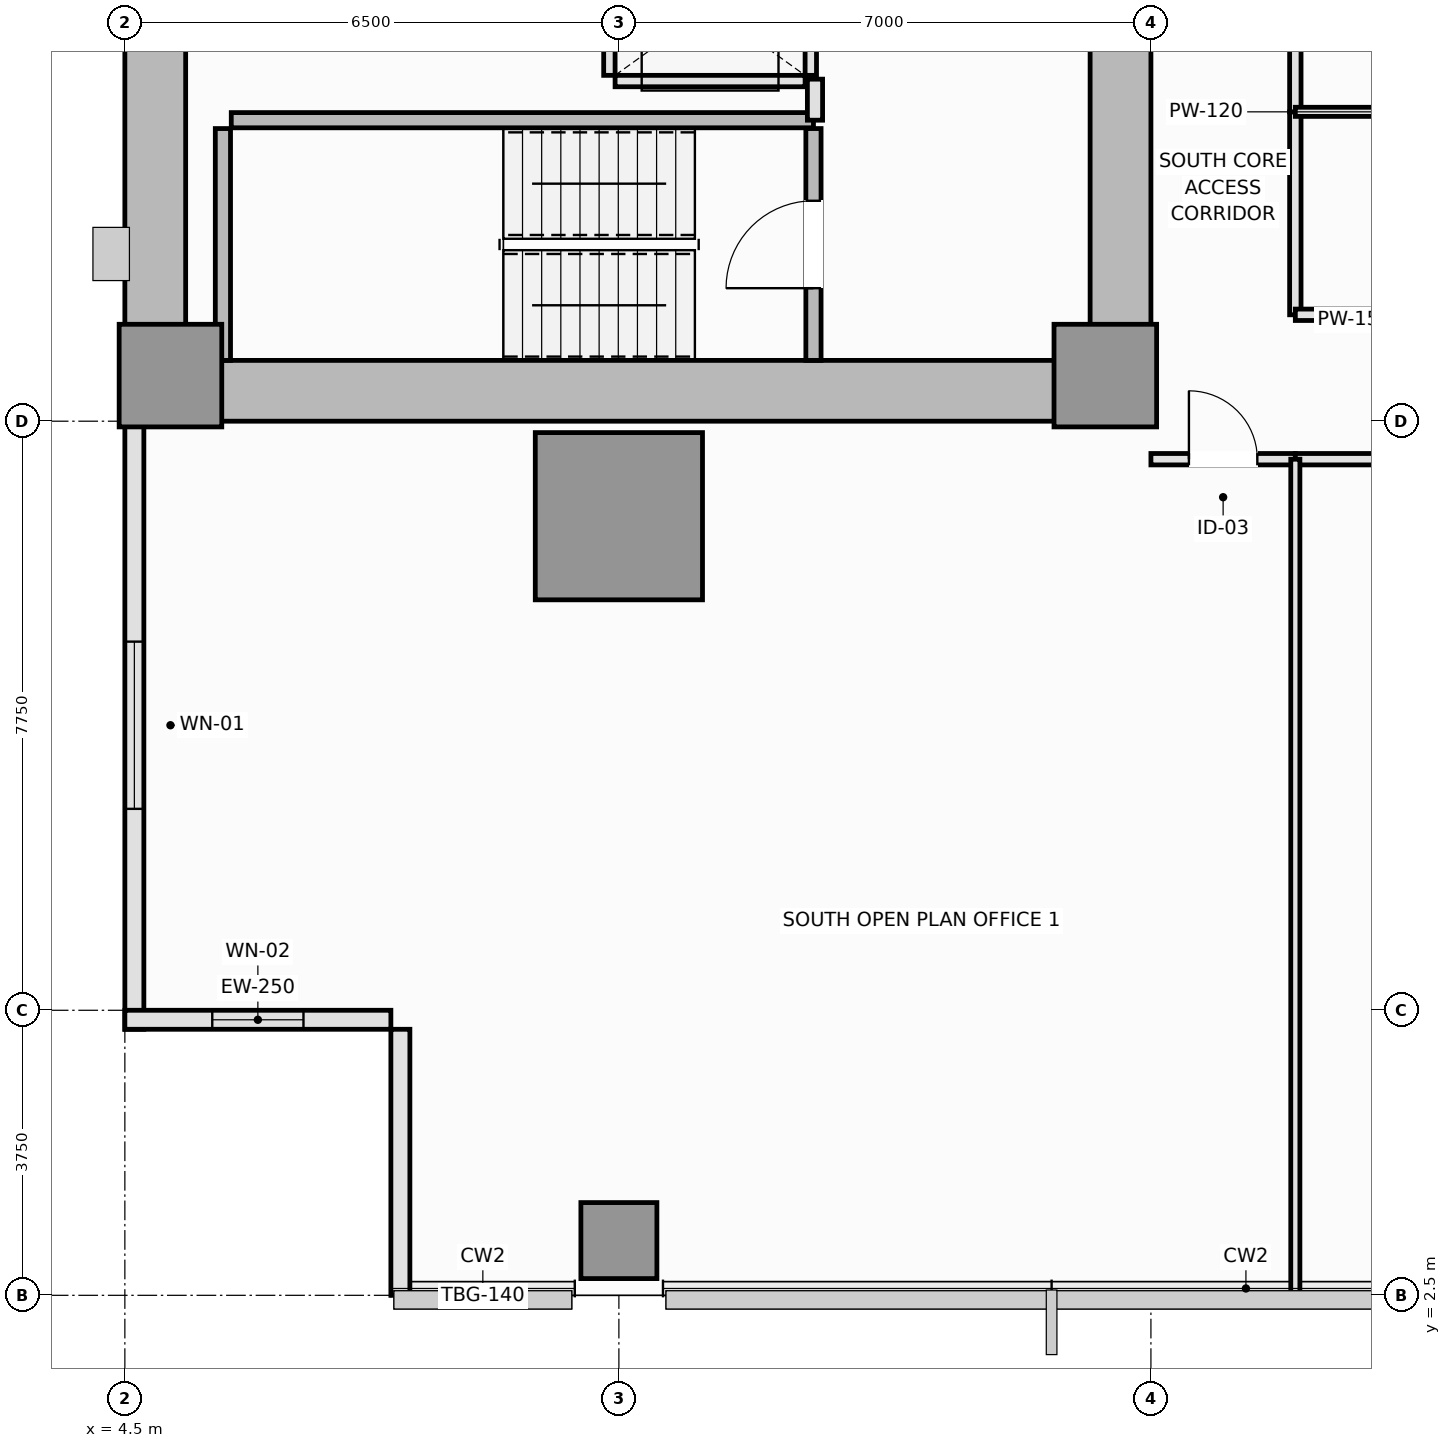
"""IFC4 building model, lengths in metres.
Left out: names, types, materials, properties, quantities, classifications, styles, units other than length and angle.
Written with IfcOpenShell. Run it as: python <this file> out.ifc"""

import sys

from ifc_helpers import new_model, si_unit, direction, frame, frame_2d, origin, origin_2d, place, context, subcontext, project, spatial, rectangle, extrude, element, fill, save


model = new_model("IFC4")
c1 = context("Model", 3, precision=1e-05, world=origin(), true_north=direction((0.0, 1.0)))
c2 = subcontext(c1, "Body", "Model", "MODEL_VIEW")
j1 = project(units=[si_unit("LENGTHUNIT", "METRE"), si_unit("PLANEANGLEUNIT", "RADIAN")], contexts=[c1])
p1 = place(None, origin())
s1 = spatial("IfcSite", under=j1, at=p1, CompositionType="ELEMENT")
p2 = place(p1, origin())
s2 = spatial("IfcBuilding", under=s1, at=p2, CompositionType="ELEMENT")
p3 = place(p2, frame((0.0, 0.0, 89.5)))
s3 = spatial("IfcBuildingStorey", under=s2, at=p3, CompositionType="ELEMENT", Elevation=89.5)
p4 = place(p3, frame((4.5, 14.4, 0.0), z_axis=(0.0, 0.0, 1.0), x_axis=(1.0, 0.0, 0.0)))
e1 = element("IfcWall", 1, at=p4, inside=s3, PredefinedType="SHEAR", context=c2, shape_type="SweptSolid", body=[
    extrude(rectangle(XDim=13.5, YDim=0.8, at=frame_2d((6.75, 0.0))), origin(), (0.0, 0.0, 1.0), 3.55),
])
p5 = place(p3, frame((4.9, 14.8, 0.0), z_axis=(0.0, 0.0, 1.0), x_axis=(0.0, 1.0, 0.0)))
e2 = element("IfcWall", 2, at=p5, inside=s3, PredefinedType="SHEAR", context=c2, shape_type="SweptSolid", body=[
    extrude(rectangle(XDim=20.9, YDim=0.8, at=frame_2d((10.45, 0.0))), origin(), (0.0, 0.0, 1.0), 3.55),
])
p6 = place(p3, frame((17.6, 14.8, 0.0), z_axis=(0.0, 0.0, 1.0), x_axis=(0.0, 1.0, 0.0)))
e3 = element("IfcWall", 3, at=p6, inside=s3, PredefinedType="SHEAR", context=c2, shape_type="SweptSolid", body=[
    extrude(rectangle(XDim=8.65, YDim=0.8, at=frame_2d((4.325, 0.0))), origin(), (0.0, 0.0, 1.0), 3.55),
])
p7 = place(p6, frame((4.1, 0.0, 0.0)))
e4 = element("IfcOpeningElement", 4, at=p7, cuts=e3, PredefinedType="OPENING", context=c2, shape_type="SweptSolid", body=[
    extrude(rectangle(XDim=1.1, YDim=2.15, at=frame_2d((0.55, 1.075))), frame((0.0, 0.41, 0.0), z_axis=(0.0, -1.0, 0.0), x_axis=(1.0, 0.0, 0.0)), (0.0, 0.0, 1.0), 0.82),
])
for number, where, z_axis, x_axis in (
    (5, (5.1, 14.6, 0.0), (0.0, 0.0, 1.0), (1.0, 0.0, 0.0)),
    (6, (17.4, 14.6, 0.0), (0.0, 0.0, 1.0), (1.0, 0.0, 0.0)),
):
    element("IfcColumn", number, at=place(p3, frame(where, z_axis=z_axis, x_axis=x_axis)), inside=s3, PredefinedType="PILASTER", context=c2, shape_type="SweptSolid", body=[
        extrude(rectangle(XDim=1.35, YDim=1.35, at=origin_2d()), origin(), (0.0, 0.0, 1.0), 3.55),
    ])
p8 = place(p3, frame((11.0, 12.75, 0.0), z_axis=(0.0, 0.0, 1.0), x_axis=(1.0, 0.0, 0.0)))
e7 = element("IfcColumn", 7, at=p8, inside=s3, PredefinedType="COLUMN", context=c2, shape_type="SweptSolid", body=[
    extrude(rectangle(XDim=2.2, YDim=2.2, at=origin_2d()), origin(), (0.0, 0.0, 1.0), 3.55),
])
p9 = place(p3, frame((11.0, 3.22, 0.0), z_axis=(0.0, 0.0, 1.0), x_axis=(1.0, 0.0, 0.0)))
e8 = element("IfcColumn", 8, at=p9, inside=s3, PredefinedType="COLUMN", context=c2, shape_type="SweptSolid", body=[
    extrude(rectangle(XDim=1.0, YDim=1.0, at=origin_2d()), origin(), (0.0, 0.0, 1.0), 3.55),
])
p10 = place(p3, frame((4.625, 14.0, 0.0), z_axis=(0.0, 0.0, 1.0), x_axis=(0.0, -1.0, 0.0)))
e9 = element("IfcWall", 9, at=p10, inside=s3, PredefinedType="SOLIDWALL", context=c2, shape_type="SweptSolid", body=[
    extrude(rectangle(XDim=8.0, YDim=0.25, at=frame_2d((4.0, 0.0))), origin(), (0.0, 0.0, 1.0), 3.35),
])
p11 = place(p10, frame((2.9, 0.0, 0.9)))
e10 = element("IfcOpeningElement", 10, at=p11, cuts=e9, PredefinedType="OPENING", context=c2, shape_type="SweptSolid", body=[
    extrude(rectangle(XDim=2.2, YDim=1.8, at=frame_2d((1.1, 0.9))), frame((0.0, 0.135, 0.0), z_axis=(0.0, -1.0, 0.0), x_axis=(1.0, 0.0, 0.0)), (0.0, 0.0, 1.0), 0.27),
])
p12 = place(p3, frame((4.5, 6.125, 0.0), z_axis=(0.0, 0.0, 1.0), x_axis=(1.0, 0.0, 0.0)))
e11 = element("IfcWall", 11, at=p12, inside=s3, PredefinedType="SOLIDWALL", context=c2, shape_type="SweptSolid", body=[
    extrude(rectangle(XDim=3.5, YDim=0.25, at=frame_2d((1.75, 0.0))), origin(), (0.0, 0.0, 1.0), 3.35),
])
p13 = place(p12, frame((1.15, 0.0, 0.9)))
e12 = element("IfcOpeningElement", 12, at=p13, cuts=e11, PredefinedType="OPENING", context=c2, shape_type="SweptSolid", body=[
    extrude(rectangle(XDim=1.2, YDim=1.8, at=frame_2d((0.6, 0.9))), frame((0.0, 0.135, 0.0), z_axis=(0.0, -1.0, 0.0), x_axis=(1.0, 0.0, 0.0)), (0.0, 0.0, 1.0), 0.27),
])
p14 = place(p3, frame((8.125, 6.0, 0.0), z_axis=(0.0, 0.0, 1.0), x_axis=(0.0, -1.0, 0.0)))
e13 = element("IfcWall", 13, at=p14, inside=s3, PredefinedType="SOLIDWALL", context=c2, shape_type="SweptSolid", body=[
    extrude(rectangle(XDim=3.5, YDim=0.25, at=frame_2d((1.75, 0.0))), origin(), (0.0, 0.0, 1.0), 3.35),
])
p15 = place(p3, frame((5.79, 14.8, 0.0), z_axis=(0.0, 0.0, 1.0), x_axis=(0.0, 1.0, 0.0)))
e14 = element("IfcWall", 14, at=p15, inside=s3, PredefinedType="SOLIDWALL", context=c2, shape_type="SweptSolid", body=[
    extrude(rectangle(XDim=3.05, YDim=0.2, at=frame_2d((1.525, 0.0))), origin(), (0.0, 0.0, 1.0), 3.55),
])
p16 = place(p3, frame((5.9, 17.96, 0.0), z_axis=(0.0, 0.0, 1.0), x_axis=(1.0, 0.0, 0.0)))
e15 = element("IfcWall", 15, at=p16, inside=s3, PredefinedType="SOLIDWALL", context=c2, shape_type="SweptSolid", body=[
    extrude(rectangle(XDim=7.66, YDim=0.2, at=frame_2d((3.83, 0.0))), origin(), (0.0, 0.0, 1.0), 3.55),
])
p17 = place(p3, frame((13.56, 14.8, 0.0), z_axis=(0.0, 0.0, 1.0), x_axis=(0.0, 1.0, 0.0)))
e16 = element("IfcWall", 16, at=p17, inside=s3, PredefinedType="SOLIDWALL", context=c2, shape_type="SweptSolid", body=[
    extrude(rectangle(XDim=3.05, YDim=0.2, at=frame_2d((1.525, 0.0))), origin(), (0.0, 0.0, 1.0), 3.55),
])
p18 = place(p17, frame((0.95, 0.0, 0.0)))
e17 = element("IfcOpeningElement", 17, at=p18, cuts=e16, PredefinedType="OPENING", context=c2, shape_type="SweptSolid", body=[
    extrude(rectangle(XDim=1.15, YDim=2.15, at=frame_2d((0.575, 1.075))), frame((0.0, 0.11, 0.0), z_axis=(0.0, -1.0, 0.0), x_axis=(1.0, 0.0, 0.0)), (0.0, 0.0, 1.0), 0.22),
])
p19 = place(p3, frame((10.95, 18.475, 0.0), z_axis=(0.0, 0.0, 1.0), x_axis=(1.0, 0.0, 0.0)))
e18 = element("IfcWall", 18, at=p19, inside=s3, PredefinedType="PARTITIONING", context=c2, shape_type="SweptSolid", body=[
    extrude(rectangle(XDim=2.5, YDim=0.15, at=frame_2d((1.25, 0.0))), origin(), (0.0, 0.0, 1.0), 3.35),
])
p20 = place(p3, frame((10.875, 18.55, 0.0), z_axis=(0.0, 0.0, 1.0), x_axis=(0.0, 1.0, 0.0)))
e19 = element("IfcWall", 19, at=p20, inside=s3, PredefinedType="PARTITIONING", context=c2, shape_type="SweptSolid", body=[
    extrude(rectangle(XDim=1.8, YDim=0.15, at=frame_2d((0.9, 0.0))), origin(), (0.0, 0.0, 1.0), 3.35),
])
p21 = place(p3, frame((13.525, 18.55, 0.0), z_axis=(0.0, 0.0, 1.0), x_axis=(0.0, 1.0, 0.0)))
e20 = element("IfcWall", 20, at=p21, inside=s3, PredefinedType="PARTITIONING", context=c2, shape_type="SweptSolid", body=[
    extrude(rectangle(XDim=1.8, YDim=0.15, at=frame_2d((0.9, 0.0))), origin(), (0.0, 0.0, 1.0), 3.35),
])
p22 = place(p21, frame((0.35, 0.0, 0.0)))
e21 = element("IfcOpeningElement", 21, at=p22, cuts=e20, PredefinedType="OPENING", context=c2, shape_type="SweptSolid", body=[
    extrude(rectangle(XDim=1.1, YDim=2.2, at=frame_2d((0.55, 1.1))), frame((0.0, 0.085, 0.0), z_axis=(0.0, -1.0, 0.0), x_axis=(1.0, 0.0, 0.0)), (0.0, 0.0, 1.0), 0.17),
])
p23 = place(p3, frame((13.58, 17.96, 0.0), z_axis=(0.0, 0.0, 1.0), x_axis=(0.0, 1.0, 0.0)))
e22 = element("IfcWall", 22, at=p23, inside=s3, PredefinedType="PARTITIONING", context=c2, shape_type="SweptSolid", body=[
    extrude(rectangle(XDim=0.54, YDim=0.2, at=frame_2d((0.27, 0.0))), origin(), (0.0, 0.0, 1.0), 3.35),
])
p24 = place(p3, frame((19.9, 15.4, 0.0), z_axis=(0.0, 0.0, 1.0), x_axis=(0.0, 1.0, 0.0)))
e23 = element("IfcWall", 23, at=p24, inside=s3, PredefinedType="PARTITIONING", context=c2, shape_type="SweptSolid", body=[
    extrude(rectangle(XDim=2.67, YDim=0.15, at=frame_2d((1.335, 0.0))), origin(), (0.0, 0.0, 1.0), 3.35),
])
p25 = place(p3, frame((19.9, 18.07, 0.0), z_axis=(0.0, 0.0, 1.0), x_axis=(0.0, 1.0, 0.0)))
e24 = element("IfcWall", 24, at=p25, inside=s3, PredefinedType="PARTITIONING", context=c2, shape_type="SweptSolid", body=[
    extrude(rectangle(XDim=2.68, YDim=0.15, at=frame_2d((1.34, 0.0))), origin(), (0.0, 0.0, 1.0), 3.35),
])
p26 = place(p3, frame((19.9, 15.4, 0.0), z_axis=(0.0, 0.0, 1.0), x_axis=(1.0, 0.0, 0.0)))
e25 = element("IfcWall", 25, at=p26, inside=s3, PredefinedType="PARTITIONING", context=c2, shape_type="SweptSolid", body=[
    extrude(rectangle(XDim=2.65, YDim=0.15, at=frame_2d((1.325, 0.0))), origin(), (0.0, 0.0, 1.0), 3.35),
])
p27 = place(p3, frame((18.0, 13.5, 0.0), z_axis=(0.0, 0.0, 1.0), x_axis=(1.0, 0.0, 0.0)))
e26 = element("IfcWall", 26, at=p27, inside=s3, PredefinedType="PARTITIONING", context=c2, shape_type="SweptSolid", body=[
    extrude(rectangle(XDim=1.9, YDim=0.15, at=frame_2d((0.95, 0.0))), origin(), (0.0, 0.0, 1.0), 3.35),
])
p28 = place(p27, frame((0.5, 0.0, 0.0)))
e27 = element("IfcOpeningElement", 27, at=p28, cuts=e26, PredefinedType="OPENING", context=c2, shape_type="SweptSolid", body=[
    extrude(rectangle(XDim=0.9, YDim=2.1, at=frame_2d((0.45, 1.05))), frame((0.0, 0.085, 0.0), z_axis=(0.0, -1.0, 0.0), x_axis=(1.0, 0.0, 0.0)), (0.0, 0.0, 1.0), 0.17),
])
p29 = place(p3, frame((19.9, 13.5, 0.0), z_axis=(0.0, 0.0, 1.0), x_axis=(1.0, 0.0, 0.0)))
e28 = element("IfcWall", 28, at=p29, inside=s3, PredefinedType="PARTITIONING", context=c2, shape_type="SweptSolid", body=[
    extrude(rectangle(XDim=3.7, YDim=0.15, at=frame_2d((1.85, 0.0))), origin(), (0.0, 0.0, 1.0), 3.35),
])
p30 = place(p29, frame((1.35, 0.0, 0.0)))
e29 = element("IfcOpeningElement", 29, at=p30, cuts=e28, PredefinedType="OPENING", context=c2, shape_type="SweptSolid", body=[
    extrude(rectangle(XDim=1.0, YDim=2.15, at=frame_2d((0.5, 1.075))), frame((0.0, 0.085, 0.0), z_axis=(0.0, -1.0, 0.0), x_axis=(1.0, 0.0, 0.0)), (0.0, 0.0, 1.0), 0.17),
])
p31 = place(p3, frame((19.9, 18.07, 0.0), z_axis=(0.0, 0.0, 1.0), x_axis=(1.0, 0.0, 0.0)))
e30 = element("IfcWall", 30, at=p31, inside=s3, PredefinedType="PARTITIONING", context=c2, shape_type="SweptSolid", body=[
    extrude(rectangle(XDim=2.65, YDim=0.12, at=frame_2d((1.325, 0.0))), origin(), (0.0, 0.0, 1.0), 3.35),
])
p32 = place(p3, frame((19.9, 2.51, 0.0), z_axis=(0.0, 0.0, 1.0), x_axis=(0.0, 1.0, 0.0)))
e31 = element("IfcWall", 31, at=p32, inside=s3, PredefinedType="PARTITIONING", context=c2, shape_type="SweptSolid", body=[
    extrude(rectangle(XDim=10.99, YDim=0.12, at=frame_2d((5.495, 0.0))), origin(), (0.0, 0.0, 1.0), 3.35),
])
p33 = place(p11, origin())
e32 = element("IfcWindow", 32, at=p33, inside=s3, PartitioningType="SINGLE_PANEL", PredefinedType="WINDOW", context=c2, shape_type="SweptSolid", body=[
    extrude(rectangle(XDim=2.2, YDim=1.8, at=frame_2d((1.1, 0.9))), frame((0.0, 0.03, 0.0), z_axis=(0.0, -1.0, 0.0), x_axis=(1.0, 0.0, 0.0)), (0.0, 0.0, 1.0), 0.06),
])
fill(e10, e32)
p34 = place(p13, origin())
e33 = element("IfcWindow", 33, at=p34, inside=s3, PartitioningType="SINGLE_PANEL", PredefinedType="WINDOW", context=c2, shape_type="SweptSolid", body=[
    extrude(rectangle(XDim=1.2, YDim=1.8, at=frame_2d((0.6, 0.9))), frame((0.0, 0.03, 0.0), z_axis=(0.0, -1.0, 0.0), x_axis=(1.0, 0.0, 0.0)), (0.0, 0.0, 1.0), 0.06),
])
fill(e12, e33)
p35 = place(p18, origin())
e34 = element("IfcDoor", 34, at=p35, inside=s3, OperationType="SINGLE_SWING_LEFT", PredefinedType="DOOR", context=c2, shape_type="SweptSolid", body=[
    extrude(rectangle(XDim=1.15, YDim=2.15, at=frame_2d((0.575, 1.075))), frame((0.0, 0.025, 0.0), z_axis=(0.0, -1.0, 0.0), x_axis=(1.0, 0.0, 0.0)), (0.0, 0.0, 1.0), 0.05),
])
fill(e17, e34)
p36 = place(p28, origin())
e35 = element("IfcDoor", 35, at=p36, inside=s3, OperationType="SINGLE_SWING_LEFT", PredefinedType="DOOR", context=c2, shape_type="SweptSolid", body=[
    extrude(rectangle(XDim=0.9, YDim=2.1, at=frame_2d((0.45, 1.05))), frame((0.0, 0.025, 0.0), z_axis=(0.0, -1.0, 0.0), x_axis=(1.0, 0.0, 0.0)), (0.0, 0.0, 1.0), 0.05),
])
fill(e27, e35)
save(model, sys.argv[1])
